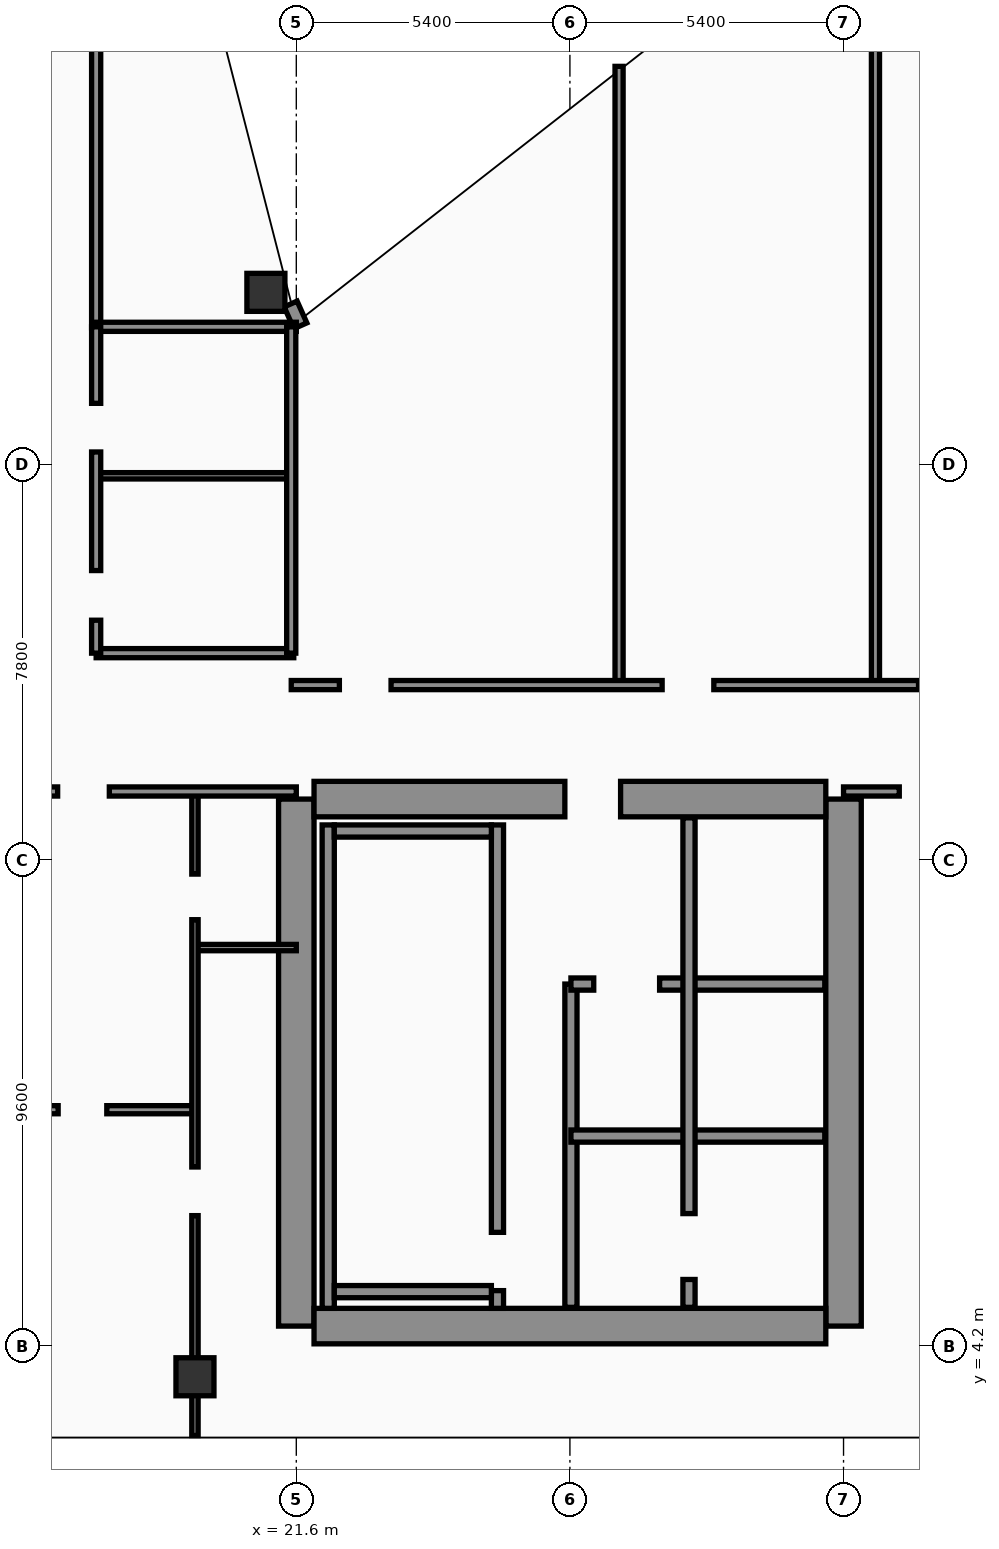
"""IFC4 building model, lengths in metres.
Left out: names, types, materials, properties, quantities, classifications, styles, units other than length and angle.
Written with IfcOpenShell. Run it as: python <this file> out.ifc"""

import sys

from ifc_helpers import new_model, si_unit, direction, frame, frame_2d, origin, origin_2d, place, context, subcontext, project, spatial, rectangle, hollow_rectangle, extrude, element, fill, save


model = new_model("IFC4")
c1 = context("Model", 3, precision=1e-05, world=origin(), true_north=direction((0.0, 1.0)))
c2 = subcontext(c1, "Body", "Model", "MODEL_VIEW")
j1 = project(units=[si_unit("LENGTHUNIT", "METRE"), si_unit("PLANEANGLEUNIT", "RADIAN")], contexts=[c1])
p1 = place(None, origin())
s1 = spatial("IfcSite", under=j1, at=p1, CompositionType="ELEMENT")
p2 = place(p1, origin())
s2 = spatial("IfcBuilding", under=s1, at=p2, CompositionType="ELEMENT")
p3 = place(p2, frame((0.0, 0.0, 211.0)))
s3 = spatial("IfcBuildingStorey", under=s2, at=p3, CompositionType="ELEMENT", Elevation=211.0)
for number, where, z_axis, x_axis in (
    (1, (21.6, 4.6, 0.0), (0.0, 0.0, 1.0), (0.0, 1.0, 0.0)),
    (2, (32.4, 4.6, 0.0), (0.0, 0.0, 1.0), (0.0, 1.0, 0.0)),
):
    element("IfcWall", number, at=place(p3, frame(where, z_axis=z_axis, x_axis=x_axis)), inside=s3, PredefinedType="SHEAR", context=c2, shape_type="SweptSolid", body=[
        extrude(rectangle(XDim=10.4, YDim=0.7, at=frame_2d((5.2, 0.0))), origin(), (0.0, 0.0, 1.0), 3.56),
    ])
p4 = place(p3, frame((21.95, 15.0, 0.0), z_axis=(0.0, 0.0, 1.0), x_axis=(1.0, 0.0, 0.0)))
e3 = element("IfcWall", 3, at=p4, inside=s3, PredefinedType="SHEAR", context=c2, shape_type="SweptSolid", body=[
    extrude(rectangle(XDim=10.1, YDim=0.7, at=frame_2d((5.05, 0.0))), origin(), (0.0, 0.0, 1.0), 3.56),
])
p5 = place(p4, frame((4.95, 0.0, 0.0)))
e4 = element("IfcOpeningElement", 4, at=p5, cuts=e3, PredefinedType="OPENING", context=c2, shape_type="SweptSolid", body=[
    extrude(rectangle(XDim=1.1, YDim=2.2, at=frame_2d((0.55, 1.1))), frame((0.0, 0.36, 0.0), z_axis=(0.0, -1.0, 0.0), x_axis=(1.0, 0.0, 0.0)), (0.0, 0.0, 1.0), 0.72),
])
p6 = place(p3, frame((21.95, 4.6, 0.0), z_axis=(0.0, 0.0, 1.0), x_axis=(1.0, 0.0, 0.0)))
e5 = element("IfcWall", 5, at=p6, inside=s3, PredefinedType="SHEAR", context=c2, shape_type="SweptSolid", body=[
    extrude(rectangle(XDim=10.1, YDim=0.7, at=frame_2d((5.05, 0.0))), origin(), (0.0, 0.0, 1.0), 3.56),
])
p7 = place(p3, frame((22.23, 4.95, 0.0), z_axis=(0.0, 0.0, 1.0), x_axis=(0.0, 1.0, 0.0)))
e6 = element("IfcWall", 6, at=p7, inside=s3, PredefinedType="SOLIDWALL", context=c2, shape_type="SweptSolid", body=[
    extrude(rectangle(XDim=9.54, YDim=0.24, at=frame_2d((4.77, 0.0))), origin(), (0.0, 0.0, 1.0), 3.56),
])
p8 = place(p3, frame((25.57, 4.95, 0.0), z_axis=(0.0, 0.0, 1.0), x_axis=(0.0, 1.0, 0.0)))
e7 = element("IfcWall", 7, at=p8, inside=s3, PredefinedType="SOLIDWALL", context=c2, shape_type="SweptSolid", body=[
    extrude(rectangle(XDim=9.54, YDim=0.24, at=frame_2d((4.77, 0.0))), origin(), (0.0, 0.0, 1.0), 3.56),
])
p9 = place(p8, frame((0.35, 0.0, 0.0)))
e8 = element("IfcOpeningElement", 8, at=p9, cuts=e7, PredefinedType="OPENING", context=c2, shape_type="SweptSolid", body=[
    extrude(rectangle(XDim=1.15, YDim=2.2, at=frame_2d((0.575, 1.1))), frame((0.0, 0.13, 0.0), z_axis=(0.0, -1.0, 0.0), x_axis=(1.0, 0.0, 0.0)), (0.0, 0.0, 1.0), 0.26),
])
for number, where, z_axis, x_axis in (
    (9, (22.35, 5.28, 0.0), (0.0, 0.0, 1.0), (1.0, 0.0, 0.0)),
    (10, (22.35, 14.37, 0.0), (0.0, 0.0, 1.0), (1.0, 0.0, 0.0)),
):
    element("IfcWall", number, at=place(p3, frame(where, z_axis=z_axis, x_axis=x_axis)), inside=s3, PredefinedType="SOLIDWALL", context=c2, shape_type="SweptSolid", body=[
        extrude(rectangle(XDim=3.1, YDim=0.24, at=frame_2d((1.55, 0.0))), origin(), (0.0, 0.0, 1.0), 3.56),
    ])
for number, where, z_axis, x_axis in (
    (11, (21.0, 25.0, 0.0), (0.0, 0.0, 1.0), (1.0, 0.0, 0.0)),
    (12, (19.6, 3.6, 0.0), (0.0, 0.0, 1.0), (1.0, 0.0, 0.0)),
):
    element("IfcColumn", number, at=place(p3, frame(where, z_axis=z_axis, x_axis=x_axis)), inside=s3, PredefinedType="COLUMN", context=c2, shape_type="SweptSolid", body=[
        extrude(hollow_rectangle(XDim=0.75, YDim=0.75, WallThickness=0.032, at=origin_2d()), origin(), (0.0, 0.0, 1.0), 3.56),
    ])
p10 = place(p3, frame((21.68, 24.34, 0.0), z_axis=(0.0, 0.0, 1.0), x_axis=(-0.40758134973, 0.913168901875, 0.0)))
e13 = element("IfcWall", 13, at=p10, inside=s3, PredefinedType="SOLIDWALL", context=c2, shape_type="SweptSolid", body=[
    extrude(rectangle(XDim=0.471, YDim=0.28, at=frame_2d((0.235, 0.0))), origin(), (0.0, 0.0, 1.0), 3.56),
])
p11 = place(p3, frame((27.02, 4.97, 0.0), z_axis=(0.0, 0.0, 1.0), x_axis=(0.0, 1.0, 0.0)))
e14 = element("IfcWall", 14, at=p11, inside=s3, PredefinedType="SOLIDWALL", context=c2, shape_type="SweptSolid", body=[
    extrude(rectangle(XDim=6.38, YDim=0.24, at=frame_2d((3.19, 0.0))), origin(), (0.0, 0.0, 1.0), 3.56),
])
p12 = place(p3, frame((27.02, 11.35, 0.0), z_axis=(0.0, 0.0, 1.0), x_axis=(1.0, 0.0, 0.0)))
e15 = element("IfcWall", 15, at=p12, inside=s3, PredefinedType="SOLIDWALL", context=c2, shape_type="SweptSolid", body=[
    extrude(rectangle(XDim=5.01, YDim=0.24, at=frame_2d((2.505, 0.0))), origin(), (0.0, 0.0, 1.0), 3.56),
])
p13 = place(p12, frame((0.45, 0.0, 0.0)))
e16 = element("IfcOpeningElement", 16, at=p13, cuts=e15, PredefinedType="OPENING", context=c2, shape_type="SweptSolid", body=[
    extrude(rectangle(XDim=1.3, YDim=2.35, at=frame_2d((0.65, 1.175))), frame((0.0, 0.13, 0.0), z_axis=(0.0, -1.0, 0.0), x_axis=(1.0, 0.0, 0.0)), (0.0, 0.0, 1.0), 0.26),
])
p14 = place(p3, frame((27.02, 8.35, 0.0), z_axis=(0.0, 0.0, 1.0), x_axis=(1.0, 0.0, 0.0)))
e17 = element("IfcWall", 17, at=p14, inside=s3, PredefinedType="SOLIDWALL", context=c2, shape_type="SweptSolid", body=[
    extrude(rectangle(XDim=5.01, YDim=0.24, at=frame_2d((2.505, 0.0))), origin(), (0.0, 0.0, 1.0), 3.09),
])
p15 = place(p3, frame((29.35, 4.97, 0.0), z_axis=(0.0, 0.0, 1.0), x_axis=(0.0, 1.0, 0.0)))
e18 = element("IfcWall", 18, at=p15, inside=s3, PredefinedType="SOLIDWALL", context=c2, shape_type="SweptSolid", body=[
    extrude(rectangle(XDim=9.66, YDim=0.24, at=frame_2d((4.83, 0.0))), origin(), (0.0, 0.0, 1.0), 3.56),
])
p16 = place(p15, frame((0.55, 0.0, 0.0)))
e19 = element("IfcOpeningElement", 19, at=p16, cuts=e18, PredefinedType="OPENING", context=c2, shape_type="SweptSolid", body=[
    extrude(rectangle(XDim=1.3, YDim=2.35, at=frame_2d((0.65, 1.175))), frame((0.0, 0.13, 0.0), z_axis=(0.0, -1.0, 0.0), x_axis=(1.0, 0.0, 0.0)), (0.0, 0.0, 1.0), 0.26),
])
p17 = place(p3, frame((19.6, 12.07, 0.0), z_axis=(0.0, 0.0, 1.0), x_axis=(1.0, 0.0, 0.0)))
e20 = element("IfcWall", 20, at=p17, inside=s3, PredefinedType="PARTITIONING", context=c2, shape_type="SweptSolid", body=[
    extrude(rectangle(XDim=2.0, YDim=0.125, at=frame_2d((1.0, 0.0))), origin(), (0.0, 0.0, 1.0), 3.56),
])
p18 = place(p3, frame((15.15, 8.87, 0.0), z_axis=(0.0, 0.0, 1.0), x_axis=(1.0, 0.0, 0.0)))
e21 = element("IfcWall", 21, at=p18, inside=s3, PredefinedType="PARTITIONING", context=c2, shape_type="SweptSolid", body=[
    extrude(rectangle(XDim=4.45, YDim=0.16, at=frame_2d((2.225, 0.0))), origin(), (0.0, 0.0, 1.0), 3.56),
])
p19 = place(p18, frame((1.75, 0.0, 0.0)))
e22 = element("IfcOpeningElement", 22, at=p19, cuts=e21, PredefinedType="OPENING", context=c2, shape_type="SweptSolid", body=[
    extrude(rectangle(XDim=0.96, YDim=2.2, at=frame_2d((0.48, 1.1))), frame((0.0, 0.09, 0.0), z_axis=(0.0, -1.0, 0.0), x_axis=(1.0, 0.0, 0.0)), (0.0, 0.0, 1.0), 0.18),
])
p20 = place(p3, frame((19.6, 2.44, 0.0), z_axis=(0.0, 0.0, 1.0), x_axis=(0.0, 1.0, 0.0)))
e23 = element("IfcWall", 23, at=p20, inside=s3, PredefinedType="PARTITIONING", context=c2, shape_type="SweptSolid", body=[
    extrude(rectangle(XDim=12.71, YDim=0.125, at=frame_2d((6.355, 0.0))), origin(), (0.0, 0.0, 1.0), 2.59),
])
p21 = place(p20, frame((4.34, 0.0, 0.0)))
e24 = element("IfcOpeningElement", 24, at=p21, cuts=e23, PredefinedType="OPENING", context=c2, shape_type="SweptSolid", body=[
    extrude(rectangle(XDim=0.96, YDim=2.2, at=frame_2d((0.48, 1.1))), frame((0.0, 0.073, 0.0), z_axis=(0.0, -1.0, 0.0), x_axis=(1.0, 0.0, 0.0)), (0.0, 0.0, 1.0), 0.145),
])
p22 = place(p20, frame((10.18, 0.0, 0.0)))
e25 = element("IfcOpeningElement", 25, at=p22, cuts=e23, PredefinedType="OPENING", context=c2, shape_type="SweptSolid", body=[
    extrude(rectangle(XDim=0.9, YDim=2.15, at=frame_2d((0.45, 1.075))), frame((0.0, 0.073, 0.0), z_axis=(0.0, -1.0, 0.0), x_axis=(1.0, 0.0, 0.0)), (0.0, 0.0, 1.0), 0.145),
])
p23 = place(p3, frame((15.15, 15.15, 0.0), z_axis=(0.0, 0.0, 1.0), x_axis=(1.0, 0.0, 0.0)))
e26 = element("IfcWall", 26, at=p23, inside=s3, PredefinedType="PARTITIONING", context=c2, shape_type="SweptSolid", body=[
    extrude(rectangle(XDim=6.45, YDim=0.18, at=frame_2d((3.225, 0.0))), origin(), (0.0, 0.0, 1.0), 2.59),
])
p24 = place(p23, frame((1.74, 0.0, 0.0)))
e27 = element("IfcOpeningElement", 27, at=p24, cuts=e26, PredefinedType="OPENING", context=c2, shape_type="SweptSolid", body=[
    extrude(rectangle(XDim=1.02, YDim=2.2, at=frame_2d((0.51, 1.1))), frame((0.0, 0.1, 0.0), z_axis=(0.0, -1.0, 0.0), x_axis=(1.0, 0.0, 0.0)), (0.0, 0.0, 1.0), 0.2),
])
p25 = place(p3, frame((17.65, 24.3, 0.0), z_axis=(0.0, 0.0, 1.0), x_axis=(0.0, 1.0, 0.0)))
e28 = element("IfcWall", 28, at=p25, inside=s3, PredefinedType="PARTITIONING", context=c2, shape_type="SweptSolid", body=[
    extrude(rectangle(XDim=18.15, YDim=0.18, at=frame_2d((9.075, 0.0))), origin(), (0.0, 0.0, 1.0), 2.94),
])
p26 = place(p3, frame((17.65, 17.88, 0.0), z_axis=(0.0, 0.0, 1.0), x_axis=(1.0, 0.0, 0.0)))
e29 = element("IfcWall", 29, at=p26, inside=s3, PredefinedType="PARTITIONING", context=c2, shape_type="SweptSolid", body=[
    extrude(rectangle(XDim=3.9, YDim=0.18, at=frame_2d((1.95, 0.0))), origin(), (0.0, 0.0, 1.0), 3.56),
])
p27 = place(p3, frame((17.65, 21.38, 0.0), z_axis=(0.0, 0.0, 1.0), x_axis=(1.0, 0.0, 0.0)))
e30 = element("IfcWall", 30, at=p27, inside=s3, PredefinedType="PARTITIONING", context=c2, shape_type="SweptSolid", body=[
    extrude(rectangle(XDim=3.9, YDim=0.125, at=frame_2d((1.95, 0.0))), origin(), (0.0, 0.0, 1.0), 3.56),
])
p28 = place(p3, frame((17.65, 24.32, 0.0), z_axis=(0.0, 0.0, 1.0), x_axis=(1.0, 0.0, 0.0)))
e31 = element("IfcWall", 31, at=p28, inside=s3, PredefinedType="PARTITIONING", context=c2, shape_type="SweptSolid", body=[
    extrude(rectangle(XDim=3.95, YDim=0.18, at=frame_2d((1.975, 0.0))), origin(), (0.0, 0.0, 1.0), 3.56),
])
p29 = place(p3, frame((21.5, 17.88, 0.0), z_axis=(0.0, 0.0, 1.0), x_axis=(0.0, 1.0, 0.0)))
e32 = element("IfcWall", 32, at=p29, inside=s3, PredefinedType="PARTITIONING", context=c2, shape_type="SweptSolid", body=[
    extrude(rectangle(XDim=6.44, YDim=0.18, at=frame_2d((3.22, 0.0))), origin(), (0.0, 0.0, 1.0), 3.56),
])
p30 = place(p3, frame((17.65, 17.88, 0.0), z_axis=(0.0, 0.0, 1.0), x_axis=(0.0, 1.0, 0.0)))
e33 = element("IfcWall", 33, at=p30, inside=s3, PredefinedType="PARTITIONING", context=c2, shape_type="SweptSolid", body=[
    extrude(rectangle(XDim=6.44, YDim=0.18, at=frame_2d((3.22, 0.0))), origin(), (0.0, 0.0, 1.0), 3.56),
])
p31 = place(p30, frame((0.65, 0.0, 0.0)))
e34 = element("IfcOpeningElement", 34, at=p31, cuts=e33, PredefinedType="OPENING", context=c2, shape_type="SweptSolid", body=[
    extrude(rectangle(XDim=0.98, YDim=2.15, at=frame_2d((0.49, 1.075))), frame((0.0, 0.1, 0.0), z_axis=(0.0, -1.0, 0.0), x_axis=(1.0, 0.0, 0.0)), (0.0, 0.0, 1.0), 0.2),
])
p32 = place(p30, frame((3.97, 0.0, 0.0)))
e35 = element("IfcOpeningElement", 35, at=p32, cuts=e33, PredefinedType="OPENING", context=c2, shape_type="SweptSolid", body=[
    extrude(rectangle(XDim=0.96, YDim=2.2, at=frame_2d((0.48, 1.1))), frame((0.0, 0.1, 0.0), z_axis=(0.0, -1.0, 0.0), x_axis=(1.0, 0.0, 0.0)), (0.0, 0.0, 1.0), 0.2),
])
p33 = place(p3, frame((32.4, 15.15, 0.0), z_axis=(0.0, 0.0, 1.0), x_axis=(1.0, 0.0, 0.0)))
e36 = element("IfcWall", 36, at=p33, inside=s3, PredefinedType="PARTITIONING", context=c2, shape_type="SweptSolid", body=[
    extrude(rectangle(XDim=13.2, YDim=0.18, at=frame_2d((6.6, 0.0))), origin(), (0.0, 0.0, 1.0), 2.94),
])
p34 = place(p33, frame((1.1, 0.0, 0.0)))
e37 = element("IfcOpeningElement", 37, at=p34, cuts=e36, PredefinedType="OPENING", context=c2, shape_type="SweptSolid", body=[
    extrude(rectangle(XDim=1.5, YDim=2.22, at=frame_2d((0.75, 1.11))), frame((0.0, 0.1, 0.0), z_axis=(0.0, -1.0, 0.0), x_axis=(1.0, 0.0, 0.0)), (0.0, 0.0, 1.0), 0.2),
])
p35 = place(p33, frame((8.5, 0.0, 0.0)))
e38 = element("IfcOpeningElement", 38, at=p35, cuts=e36, PredefinedType="OPENING", context=c2, shape_type="SweptSolid", body=[
    extrude(rectangle(XDim=1.02, YDim=2.2, at=frame_2d((0.51, 1.1))), frame((0.0, 0.1, 0.0), z_axis=(0.0, -1.0, 0.0), x_axis=(1.0, 0.0, 0.0)), (0.0, 0.0, 1.0), 0.2),
])
p36 = place(p3, frame((27.97, 17.25, 0.0), z_axis=(0.0, 0.0, 1.0), x_axis=(0.0, 1.0, 0.0)))
e39 = element("IfcWall", 39, at=p36, inside=s3, PredefinedType="PARTITIONING", context=c2, shape_type="SweptSolid", body=[
    extrude(rectangle(XDim=12.21, YDim=0.16, at=frame_2d((6.105, 0.0))), origin(), (0.0, 0.0, 1.0), 2.94),
])
p37 = place(p3, frame((33.03, 17.25, 0.0), z_axis=(0.0, 0.0, 1.0), x_axis=(0.0, 1.0, 0.0)))
e40 = element("IfcWall", 40, at=p37, inside=s3, PredefinedType="PARTITIONING", context=c2, shape_type="SweptSolid", body=[
    extrude(rectangle(XDim=16.16, YDim=0.16, at=frame_2d((8.08, 0.0))), origin(), (0.0, 0.0, 1.0), 2.94),
])
p38 = place(p3, frame((21.5, 17.25, 0.0), z_axis=(0.0, 0.0, 1.0), x_axis=(1.0, 0.0, 0.0)))
e41 = element("IfcWall", 41, at=p38, inside=s3, PredefinedType="PARTITIONING", context=c2, shape_type="SweptSolid", body=[
    extrude(rectangle(XDim=17.25, YDim=0.18, at=frame_2d((8.625, 0.0))), origin(), (0.0, 0.0, 1.0), 2.94),
])
p39 = place(p38, frame((0.95, 0.0, 0.0)))
e42 = element("IfcOpeningElement", 42, at=p39, cuts=e41, PredefinedType="OPENING", context=c2, shape_type="SweptSolid", body=[
    extrude(rectangle(XDim=1.02, YDim=2.2, at=frame_2d((0.51, 1.1))), frame((0.0, 0.1, 0.0), z_axis=(0.0, -1.0, 0.0), x_axis=(1.0, 0.0, 0.0)), (0.0, 0.0, 1.0), 0.2),
])
p40 = place(p38, frame((7.32, 0.0, 0.0)))
e43 = element("IfcOpeningElement", 43, at=p40, cuts=e41, PredefinedType="OPENING", context=c2, shape_type="SweptSolid", body=[
    extrude(rectangle(XDim=1.02, YDim=2.2, at=frame_2d((0.51, 1.1))), frame((0.0, 0.1, 0.0), z_axis=(0.0, -1.0, 0.0), x_axis=(1.0, 0.0, 0.0)), (0.0, 0.0, 1.0), 0.2),
])
p41 = place(p38, frame((12.38, 0.0, 0.0)))
e44 = element("IfcOpeningElement", 44, at=p41, cuts=e41, PredefinedType="OPENING", context=c2, shape_type="SweptSolid", body=[
    extrude(rectangle(XDim=1.02, YDim=2.2, at=frame_2d((0.51, 1.1))), frame((0.0, 0.1, 0.0), z_axis=(0.0, -1.0, 0.0), x_axis=(1.0, 0.0, 0.0)), (0.0, 0.0, 1.0), 0.2),
])
p42 = place(p13, origin())
e45 = element("IfcDoor", 45, at=p42, inside=s3, OperationType="DOUBLE_DOOR_SLIDING", PredefinedType="DOOR", context=c2, shape_type="SweptSolid", body=[
    extrude(rectangle(XDim=1.3, YDim=2.35, at=frame_2d((0.65, 1.175))), frame((0.0, 0.025, 0.0), z_axis=(0.0, -1.0, 0.0), x_axis=(1.0, 0.0, 0.0)), (0.0, 0.0, 1.0), 0.05),
])
fill(e16, e45)
p43 = place(p16, origin())
e46 = element("IfcDoor", 46, at=p43, inside=s3, OperationType="DOUBLE_DOOR_SLIDING", PredefinedType="DOOR", context=c2, shape_type="SweptSolid", body=[
    extrude(rectangle(XDim=1.3, YDim=2.35, at=frame_2d((0.65, 1.175))), frame((0.0, 0.025, 0.0), z_axis=(0.0, -1.0, 0.0), x_axis=(1.0, 0.0, 0.0)), (0.0, 0.0, 1.0), 0.05),
])
fill(e19, e46)
p44 = place(p19, origin())
e47 = element("IfcDoor", 47, at=p44, inside=s3, OperationType="SINGLE_SWING_LEFT", PredefinedType="DOOR", context=c2, shape_type="SweptSolid", body=[
    extrude(rectangle(XDim=0.96, YDim=2.2, at=frame_2d((0.48, 1.1))), frame((0.0, 0.025, 0.0), z_axis=(0.0, -1.0, 0.0), x_axis=(1.0, 0.0, 0.0)), (0.0, 0.0, 1.0), 0.05),
])
fill(e22, e47)
p45 = place(p21, origin())
e48 = element("IfcDoor", 48, at=p45, inside=s3, OperationType="SINGLE_SWING_LEFT", PredefinedType="DOOR", context=c2, shape_type="SweptSolid", body=[
    extrude(rectangle(XDim=0.96, YDim=2.2, at=frame_2d((0.48, 1.1))), frame((0.0, 0.025, 0.0), z_axis=(0.0, -1.0, 0.0), x_axis=(1.0, 0.0, 0.0)), (0.0, 0.0, 1.0), 0.05),
])
fill(e24, e48)
p46 = place(p22, origin())
e49 = element("IfcDoor", 49, at=p46, inside=s3, OperationType="SINGLE_SWING_RIGHT", PredefinedType="DOOR", context=c2, shape_type="SweptSolid", body=[
    extrude(rectangle(XDim=0.9, YDim=2.15, at=frame_2d((0.45, 1.075))), frame((0.0, 0.025, 0.0), z_axis=(0.0, -1.0, 0.0), x_axis=(1.0, 0.0, 0.0)), (0.0, 0.0, 1.0), 0.05),
])
fill(e25, e49)
p47 = place(p24, origin())
e50 = element("IfcDoor", 50, at=p47, inside=s3, OperationType="SINGLE_SWING_LEFT", PredefinedType="DOOR", context=c2, shape_type="SweptSolid", body=[
    extrude(rectangle(XDim=1.02, YDim=2.2, at=frame_2d((0.51, 1.1))), frame((0.0, 0.025, 0.0), z_axis=(0.0, -1.0, 0.0), x_axis=(1.0, 0.0, 0.0)), (0.0, 0.0, 1.0), 0.05),
])
fill(e27, e50)
p48 = place(p31, origin())
e51 = element("IfcDoor", 51, at=p48, inside=s3, OperationType="SINGLE_SWING_LEFT", PredefinedType="DOOR", context=c2, shape_type="SweptSolid", body=[
    extrude(rectangle(XDim=0.98, YDim=2.15, at=frame_2d((0.49, 1.075))), frame((0.0, 0.025, 0.0), z_axis=(0.0, -1.0, 0.0), x_axis=(1.0, 0.0, 0.0)), (0.0, 0.0, 1.0), 0.05),
])
fill(e34, e51)
p49 = place(p32, origin())
e52 = element("IfcDoor", 52, at=p49, inside=s3, OperationType="SINGLE_SWING_RIGHT", PredefinedType="DOOR", context=c2, shape_type="SweptSolid", body=[
    extrude(rectangle(XDim=0.96, YDim=2.2, at=frame_2d((0.48, 1.1))), frame((0.0, 0.025, 0.0), z_axis=(0.0, -1.0, 0.0), x_axis=(1.0, 0.0, 0.0)), (0.0, 0.0, 1.0), 0.05),
])
fill(e35, e52)
p50 = place(p34, origin())
e53 = element("IfcDoor", 53, at=p50, inside=s3, OperationType="SINGLE_SWING_LEFT", PredefinedType="DOOR", context=c2, shape_type="SweptSolid", body=[
    extrude(rectangle(XDim=1.5, YDim=2.22, at=frame_2d((0.75, 1.11))), frame((0.0, 0.025, 0.0), z_axis=(0.0, -1.0, 0.0), x_axis=(1.0, 0.0, 0.0)), (0.0, 0.0, 1.0), 0.05),
])
fill(e37, e53)
p51 = place(p39, origin())
e54 = element("IfcDoor", 54, at=p51, inside=s3, OperationType="SINGLE_SWING_RIGHT", PredefinedType="DOOR", context=c2, shape_type="SweptSolid", body=[
    extrude(rectangle(XDim=1.02, YDim=2.2, at=frame_2d((0.51, 1.1))), frame((0.0, 0.025, 0.0), z_axis=(0.0, -1.0, 0.0), x_axis=(1.0, 0.0, 0.0)), (0.0, 0.0, 1.0), 0.05),
])
fill(e42, e54)
p52 = place(p40, origin())
e55 = element("IfcDoor", 55, at=p52, inside=s3, OperationType="SINGLE_SWING_LEFT", PredefinedType="DOOR", context=c2, shape_type="SweptSolid", body=[
    extrude(rectangle(XDim=1.02, YDim=2.2, at=frame_2d((0.51, 1.1))), frame((0.0, 0.025, 0.0), z_axis=(0.0, -1.0, 0.0), x_axis=(1.0, 0.0, 0.0)), (0.0, 0.0, 1.0), 0.05),
])
fill(e43, e55)
p53 = place(p41, origin())
e56 = element("IfcDoor", 56, at=p53, inside=s3, OperationType="SINGLE_SWING_RIGHT", PredefinedType="DOOR", context=c2, shape_type="SweptSolid", body=[
    extrude(rectangle(XDim=1.02, YDim=2.2, at=frame_2d((0.51, 1.1))), frame((0.0, 0.025, 0.0), z_axis=(0.0, -1.0, 0.0), x_axis=(1.0, 0.0, 0.0)), (0.0, 0.0, 1.0), 0.05),
])
fill(e44, e56)
p54 = place(p9, origin())
e57 = element("IfcDoor", 57, at=p54, inside=s3, OperationType="SINGLE_SWING_RIGHT", PredefinedType="DOOR", context=c2, shape_type="SweptSolid", body=[
    extrude(rectangle(XDim=1.15, YDim=2.2, at=frame_2d((0.575, 1.1))), frame((0.0, 0.025, 0.0), z_axis=(0.0, -1.0, 0.0), x_axis=(1.0, 0.0, 0.0)), (0.0, 0.0, 1.0), 0.05),
])
fill(e8, e57)
p55 = place(p5, origin())
e58 = element("IfcDoor", 58, at=p55, inside=s3, OperationType="SINGLE_SWING_RIGHT", PredefinedType="DOOR", context=c2, shape_type="SweptSolid", body=[
    extrude(rectangle(XDim=1.1, YDim=2.2, at=frame_2d((0.55, 1.1))), frame((0.0, 0.025, 0.0), z_axis=(0.0, -1.0, 0.0), x_axis=(1.0, 0.0, 0.0)), (0.0, 0.0, 1.0), 0.05),
])
fill(e4, e58)
save(model, sys.argv[1])
